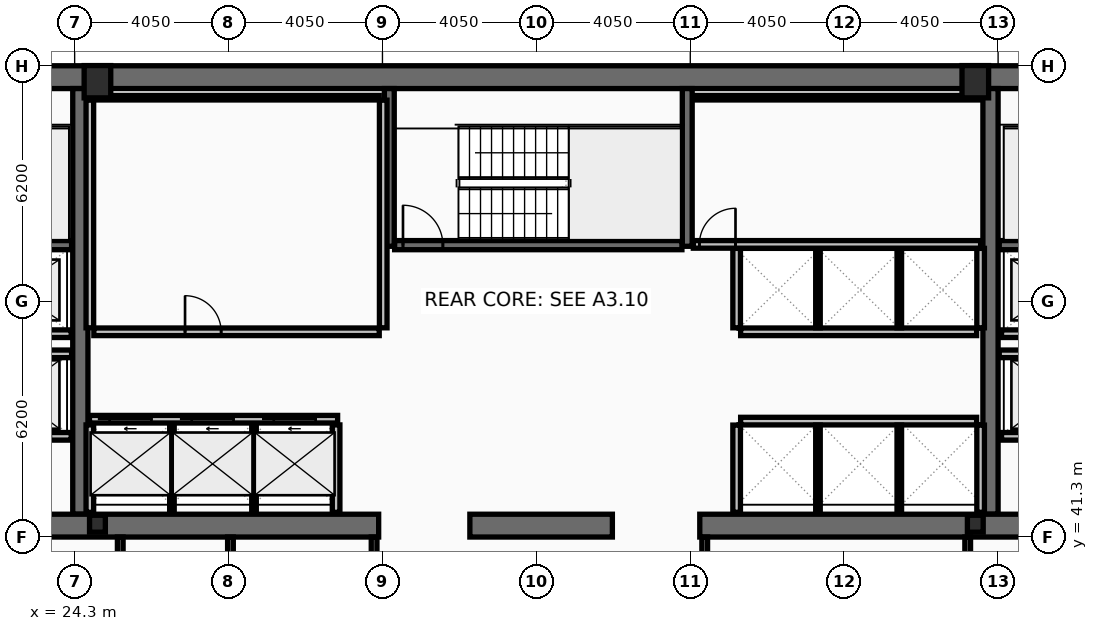
"""IFC4 building model, lengths in metres.
Left out: names, types, materials, properties, quantities, classifications, styles, units other than length and angle.
Written with IfcOpenShell. Run it as: python <this file> out.ifc"""

import sys

from ifc_helpers import new_model, si_unit, direction, frame, frame_2d, origin, origin_2d, place, context, subcontext, project, spatial, rectangle, hollow_rectangle, i_section, extrude, element, fill, save


model = new_model("IFC4")
c1 = context("Model", 3, precision=1e-05, world=origin(), true_north=direction((0.0, 1.0)))
c2 = subcontext(c1, "Body", "Model", "MODEL_VIEW")
j1 = project(units=[si_unit("LENGTHUNIT", "METRE"), si_unit("PLANEANGLEUNIT", "RADIAN")], contexts=[c1])
p1 = place(None, origin())
s1 = spatial("IfcSite", under=j1, at=p1, CompositionType="ELEMENT")
p2 = place(p1, origin())
s2 = spatial("IfcBuilding", under=s1, at=p2, CompositionType="ELEMENT")
p3 = place(p2, frame((0.0, 0.0, 177.0)))
s3 = spatial("IfcBuildingStorey", under=s2, at=p3, CompositionType="ELEMENT", Elevation=177.0)
p4 = place(p3, frame((16.2, 53.4, 0.0), z_axis=(0.0, 0.0, 1.0), x_axis=(1.0, 0.0, 0.0)))
e1 = element("IfcWall", 1, at=p4, inside=s3, PredefinedType="SHEAR", context=c2, shape_type="SweptSolid", body=[
    extrude(rectangle(XDim=40.5, YDim=0.6, at=frame_2d((20.25, 0.0))), origin(), (0.0, 0.0, 1.0), 3.44),
])
for number, where, z_axis, x_axis in (
    (2, (24.45, 41.9, 0.0), (0.0, 0.0, 1.0), (0.0, 1.0, 0.0)),
    (3, (48.4, 41.9, 0.0), (0.0, 0.0, 1.0), (0.0, 1.0, 0.0)),
):
    element("IfcWall", number, at=place(p3, frame(where, z_axis=z_axis, x_axis=x_axis)), inside=s3, PredefinedType="SHEAR", context=c2, shape_type="SweptSolid", body=[
        extrude(rectangle(XDim=11.2, YDim=0.4, at=frame_2d((5.6, 0.0))), origin(), (0.0, 0.0, 1.0), 3.44),
    ])
p5 = place(p3, frame((32.3, 41.6, 0.0), z_axis=(0.0, 0.0, 1.0), x_axis=(-1.0, 0.0, 0.0)))
e4 = element("IfcWall", 4, at=p5, inside=s3, PredefinedType="SHEAR", context=c2, shape_type="SweptSolid", body=[
    extrude(rectangle(XDim=11.45, YDim=0.6, at=frame_2d((5.725, 0.0))), origin(), (0.0, 0.0, 1.0), 3.44),
])
p6 = place(p3, frame((38.45, 41.6, 0.0), z_axis=(0.0, 0.0, 1.0), x_axis=(-1.0, 0.0, 0.0)))
e5 = element("IfcWall", 5, at=p6, inside=s3, PredefinedType="SHEAR", context=c2, shape_type="SweptSolid", body=[
    extrude(rectangle(XDim=3.75, YDim=0.6, at=frame_2d((1.875, 0.0))), origin(), (0.0, 0.0, 1.0), 3.44),
])
p7 = place(p3, frame((52.05, 41.6, 0.0), z_axis=(0.0, 0.0, 1.0), x_axis=(-1.0, 0.0, 0.0)))
e6 = element("IfcWall", 6, at=p7, inside=s3, PredefinedType="SHEAR", context=c2, shape_type="SweptSolid", body=[
    extrude(rectangle(XDim=11.3, YDim=0.6, at=frame_2d((5.65, 0.0))), origin(), (0.0, 0.0, 1.0), 3.44),
])
for number, where, z_axis, x_axis in (
    (7, (32.58, 48.95, 0.0), (0.0, 0.0, 1.0), (0.0, 1.0, 0.0)),
    (8, (40.42, 48.95, 0.0), (0.0, 0.0, 1.0), (0.0, 1.0, 0.0)),
):
    element("IfcWall", number, at=place(p3, frame(where, z_axis=z_axis, x_axis=x_axis)), inside=s3, PredefinedType="SHEAR", context=c2, shape_type="SweptSolid", body=[
        extrude(rectangle(XDim=4.15, YDim=0.26, at=frame_2d((2.075, 0.0))), origin(), (0.0, 0.0, 1.0), 3.44),
    ])
p8 = place(p3, frame((16.8, 48.98, 0.0), z_axis=(0.0, 0.0, 1.0), x_axis=(1.0, 0.0, 0.0)))
e9 = element("IfcWall", 9, at=p8, inside=s3, PredefinedType="SHEAR", context=c2, shape_type="SweptSolid", body=[
    extrude(rectangle(XDim=7.42, YDim=0.24, at=frame_2d((3.71, 0.0))), origin(), (0.0, 0.0, 1.0), 3.44),
])
p9 = place(p8, frame((0.22, 0.0, 0.0)))
e10 = element("IfcOpeningElement", 10, at=p9, cuts=e9, PredefinedType="OPENING", context=c2, shape_type="SweptSolid", body=[
    extrude(rectangle(XDim=1.05, YDim=2.15, at=frame_2d((0.525, 1.075))), frame((0.0, 0.13, 0.0), z_axis=(0.0, -1.0, 0.0), x_axis=(1.0, 0.0, 0.0)), (0.0, 0.0, 1.0), 0.26),
])
p10 = place(p3, frame((48.63, 48.98, 0.0), z_axis=(0.0, 0.0, 1.0), x_axis=(1.0, 0.0, 0.0)))
e11 = element("IfcWall", 11, at=p10, inside=s3, PredefinedType="SHEAR", context=c2, shape_type="SweptSolid", body=[
    extrude(rectangle(XDim=7.47, YDim=0.24, at=frame_2d((3.735, 0.0))), origin(), (0.0, 0.0, 1.0), 3.44),
])
p11 = place(p10, frame((6.2, 0.0, 0.0)))
e12 = element("IfcOpeningElement", 12, at=p11, cuts=e11, PredefinedType="OPENING", context=c2, shape_type="SweptSolid", body=[
    extrude(rectangle(XDim=1.05, YDim=2.15, at=frame_2d((0.525, 1.075))), frame((0.0, 0.13, 0.0), z_axis=(0.0, -1.0, 0.0), x_axis=(1.0, 0.0, 0.0)), (0.0, 0.0, 1.0), 0.26),
])
p12 = place(p3, frame((32.72, 48.98, 0.0), z_axis=(0.0, 0.0, 1.0), x_axis=(1.0, 0.0, 0.0)))
e13 = element("IfcWall", 13, at=p12, inside=s3, PredefinedType="SHEAR", context=c2, shape_type="SweptSolid", body=[
    extrude(rectangle(XDim=7.56, YDim=0.24, at=frame_2d((3.78, 0.0))), origin(), (0.0, 0.0, 1.0), 3.44),
])
p13 = place(p12, frame((0.22, 0.0, 0.0)))
e14 = element("IfcOpeningElement", 14, at=p13, cuts=e13, PredefinedType="OPENING", context=c2, shape_type="SweptSolid", body=[
    extrude(rectangle(XDim=1.05, YDim=2.15, at=frame_2d((0.525, 1.075))), frame((0.0, 0.13, 0.0), z_axis=(0.0, -1.0, 0.0), x_axis=(1.0, 0.0, 0.0)), (0.0, 0.0, 1.0), 0.26),
])
for number, where, z_axis, x_axis in (
    (15, (24.9, 53.28, 0.0), (0.0, 0.0, 1.0), (1.0, 0.0, 0.0)),
    (16, (48.0, 53.28, 0.0), (0.0, 0.0, 1.0), (1.0, 0.0, 0.0)),
):
    element("IfcColumn", number, at=place(p3, frame(where, z_axis=z_axis, x_axis=x_axis)), inside=s3, PredefinedType="COLUMN", context=c2, shape_type="SweptSolid", body=[
        extrude(hollow_rectangle(XDim=0.7, YDim=0.85, WallThickness=0.05, at=origin_2d()), origin(), (0.0, 0.0, 1.0), 3.6),
    ])
for number, where, z_axis, x_axis in (
    (17, (24.9, 41.65, 0.0), (0.0, 0.0, 1.0), (1.0, 0.0, 0.0)),
    (18, (48.0, 41.65, 0.0), (0.0, 0.0, 1.0), (1.0, 0.0, 0.0)),
):
    element("IfcColumn", number, at=place(p3, frame(where, z_axis=z_axis, x_axis=x_axis)), inside=s3, PredefinedType="COLUMN", context=c2, shape_type="SweptSolid", body=[
        extrude(i_section(OverallWidth=0.416, OverallDepth=0.446, WebThickness=0.039, FlangeThickness=0.063, at=origin_2d()), origin(), (0.0, 0.0, 1.0), 3.6),
    ])
p14 = place(p3, frame((24.69, 44.4, 0.0), z_axis=(0.0, 0.0, 1.0), x_axis=(1.0, 0.0, 0.0)))
e19 = element("IfcWall", 19, at=p14, inside=s3, PredefinedType="PARTITIONING", context=c2, shape_type="SweptSolid", body=[
    extrude(rectangle(XDim=6.53, YDim=0.2, at=frame_2d((3.265, 0.0))), origin(), (0.0, 0.0, 1.0), 3.44),
])
p15 = place(p14, frame((0.53, 0.0, 0.0)))
e20 = element("IfcOpeningElement", 20, at=p15, cuts=e19, PredefinedType="OPENING", context=c2, shape_type="SweptSolid", body=[
    extrude(rectangle(XDim=1.1, YDim=2.18, at=frame_2d((0.55, 1.09))), frame((0.0, 0.11, 0.0), z_axis=(0.0, -1.0, 0.0), x_axis=(1.0, 0.0, 0.0)), (0.0, 0.0, 1.0), 0.22),
])
p16 = place(p14, frame((2.69, 0.0, 0.0)))
e21 = element("IfcOpeningElement", 21, at=p16, cuts=e19, PredefinedType="OPENING", context=c2, shape_type="SweptSolid", body=[
    extrude(rectangle(XDim=1.1, YDim=2.18, at=frame_2d((0.55, 1.09))), frame((0.0, 0.11, 0.0), z_axis=(0.0, -1.0, 0.0), x_axis=(1.0, 0.0, 0.0)), (0.0, 0.0, 1.0), 0.22),
])
p17 = place(p14, frame((4.85, 0.0, 0.0)))
e22 = element("IfcOpeningElement", 22, at=p17, cuts=e19, PredefinedType="OPENING", context=c2, shape_type="SweptSolid", body=[
    extrude(rectangle(XDim=1.1, YDim=2.18, at=frame_2d((0.55, 1.09))), frame((0.0, 0.11, 0.0), z_axis=(0.0, -1.0, 0.0), x_axis=(1.0, 0.0, 0.0)), (0.0, 0.0, 1.0), 0.22),
])
p18 = place(p3, frame((51.61, 43.95, 0.0), z_axis=(0.0, 0.0, 1.0), x_axis=(-1.0, 0.0, 0.0)))
e23 = element("IfcWall", 23, at=p18, inside=s3, PredefinedType="PARTITIONING", context=c2, shape_type="SweptSolid", body=[
    extrude(rectangle(XDim=2.92, YDim=0.2, at=frame_2d((1.46, 0.0))), origin(), (0.0, 0.0, 1.0), 3.44),
])
p19 = place(p18, frame((0.81, 0.0, 0.0)))
e24 = element("IfcOpeningElement", 24, at=p19, cuts=e23, PredefinedType="OPENING", context=c2, shape_type="SweptSolid", body=[
    extrude(rectangle(XDim=1.3, YDim=2.18, at=frame_2d((0.65, 1.09))), frame((0.0, 0.11, 0.0), z_axis=(0.0, -1.0, 0.0), x_axis=(1.0, 0.0, 0.0)), (0.0, 0.0, 1.0), 0.22),
])
p20 = place(p3, frame((24.21, 43.95, 0.0), z_axis=(0.0, 0.0, 1.0), x_axis=(-1.0, 0.0, 0.0)))
e25 = element("IfcWall", 25, at=p20, inside=s3, PredefinedType="PARTITIONING", context=c2, shape_type="SweptSolid", body=[
    extrude(rectangle(XDim=2.97, YDim=0.2, at=frame_2d((1.485, 0.0))), origin(), (0.0, 0.0, 1.0), 3.44),
])
p21 = place(p20, frame((0.86, 0.0, 0.0)))
e26 = element("IfcOpeningElement", 26, at=p21, cuts=e25, PredefinedType="OPENING", context=c2, shape_type="SweptSolid", body=[
    extrude(rectangle(XDim=1.3, YDim=2.18, at=frame_2d((0.65, 1.09))), frame((0.0, 0.11, 0.0), z_axis=(0.0, -1.0, 0.0), x_axis=(1.0, 0.0, 0.0)), (0.0, 0.0, 1.0), 0.22),
])
p22 = place(p3, frame((51.61, 46.65, 0.0), z_axis=(0.0, 0.0, 1.0), x_axis=(-1.0, 0.0, 0.0)))
e27 = element("IfcWall", 27, at=p22, inside=s3, PredefinedType="PARTITIONING", context=c2, shape_type="SweptSolid", body=[
    extrude(rectangle(XDim=2.92, YDim=0.2, at=frame_2d((1.46, 0.0))), origin(), (0.0, 0.0, 1.0), 3.44),
])
p23 = place(p22, frame((0.86, 0.0, 0.0)))
e28 = element("IfcOpeningElement", 28, at=p23, cuts=e27, PredefinedType="OPENING", context=c2, shape_type="SweptSolid", body=[
    extrude(rectangle(XDim=1.2, YDim=2.18, at=frame_2d((0.6, 1.09))), frame((0.0, 0.11, 0.0), z_axis=(0.0, -1.0, 0.0), x_axis=(1.0, 0.0, 0.0)), (0.0, 0.0, 1.0), 0.22),
])
p24 = place(p3, frame((24.21, 46.65, 0.0), z_axis=(0.0, 0.0, 1.0), x_axis=(-1.0, 0.0, 0.0)))
e29 = element("IfcWall", 29, at=p24, inside=s3, PredefinedType="PARTITIONING", context=c2, shape_type="SweptSolid", body=[
    extrude(rectangle(XDim=2.97, YDim=0.2, at=frame_2d((1.485, 0.0))), origin(), (0.0, 0.0, 1.0), 3.44),
])
p25 = place(p24, frame((0.91, 0.0, 0.0)))
e30 = element("IfcOpeningElement", 30, at=p25, cuts=e29, PredefinedType="OPENING", context=c2, shape_type="SweptSolid", body=[
    extrude(rectangle(XDim=1.2, YDim=2.18, at=frame_2d((0.6, 1.09))), frame((0.0, 0.11, 0.0), z_axis=(0.0, -1.0, 0.0), x_axis=(1.0, 0.0, 0.0)), (0.0, 0.0, 1.0), 0.22),
])
p26 = place(p3, frame((21.2, 46.12, 0.0), z_axis=(0.0, 0.0, 1.0), x_axis=(1.0, 0.0, 0.0)))
e31 = element("IfcWall", 31, at=p26, inside=s3, PredefinedType="PARTITIONING", context=c2, shape_type="SweptSolid", body=[
    extrude(rectangle(XDim=3.02, YDim=0.2, at=frame_2d((1.51, 0.0))), origin(), (0.0, 0.0, 1.0), 3.44),
])
p27 = place(p3, frame((48.63, 46.12, 0.0), z_axis=(0.0, 0.0, 1.0), x_axis=(1.0, 0.0, 0.0)))
e32 = element("IfcWall", 32, at=p27, inside=s3, PredefinedType="PARTITIONING", context=c2, shape_type="SweptSolid", body=[
    extrude(rectangle(XDim=3.07, YDim=0.2, at=frame_2d((1.535, 0.0))), origin(), (0.0, 0.0, 1.0), 3.44),
])
for number, where, z_axis, x_axis in (
    (33, (24.7, 46.805, 0.0), (0.0, 0.0, 1.0), (0.0, 1.0, 0.0)),
    (34, (32.42, 46.805, 0.0), (0.0, 0.0, 1.0), (0.0, 1.0, 0.0)),
):
    element("IfcWall", number, at=place(p3, frame(where, z_axis=z_axis, x_axis=x_axis)), inside=s3, PredefinedType="PARTITIONING", context=c2, shape_type="SweptSolid", body=[
        extrude(rectangle(XDim=5.99, YDim=0.2, at=frame_2d((2.995, 0.0))), origin(), (0.0, 0.0, 1.0), 3.44),
    ])
p28 = place(p3, frame((24.805, 52.86, 0.0), z_axis=(0.0, 0.0, 1.0), x_axis=(1.0, 0.0, 0.0)))
e35 = element("IfcWall", 35, at=p28, inside=s3, PredefinedType="PARTITIONING", context=c2, shape_type="SweptSolid", body=[
    extrude(rectangle(XDim=7.51, YDim=0.12, at=frame_2d((3.755, 0.0))), origin(), (0.0, 0.0, 1.0), 3.44),
])
p29 = place(p3, frame((24.805, 46.7, 0.0), z_axis=(0.0, 0.0, 1.0), x_axis=(1.0, 0.0, 0.0)))
e36 = element("IfcWall", 36, at=p29, inside=s3, PredefinedType="PARTITIONING", context=c2, shape_type="SweptSolid", body=[
    extrude(rectangle(XDim=7.51, YDim=0.2, at=frame_2d((3.755, 0.0))), origin(), (0.0, 0.0, 1.0), 3.44),
])
p30 = place(p29, frame((2.4, 0.0, 0.0)))
e37 = element("IfcOpeningElement", 37, at=p30, cuts=e36, PredefinedType="OPENING", context=c2, shape_type="SweptSolid", body=[
    extrude(rectangle(XDim=0.95, YDim=2.1, at=frame_2d((0.475, 1.05))), frame((0.0, 0.11, 0.0), z_axis=(0.0, -1.0, 0.0), x_axis=(1.0, 0.0, 0.0)), (0.0, 0.0, 1.0), 0.22),
])
for number, where, z_axis, x_axis in (
    (38, (24.7, 41.95, 0.0), (0.0, 0.0, 1.0), (0.0, 1.0, 0.0)),
    (39, (31.18, 41.95, 0.0), (0.0, 0.0, 1.0), (0.0, 1.0, 0.0)),
):
    element("IfcWall", number, at=place(p3, frame(where, z_axis=z_axis, x_axis=x_axis)), inside=s3, PredefinedType="PARTITIONING", context=c2, shape_type="SweptSolid", body=[
        extrude(rectangle(XDim=2.3, YDim=0.2, at=frame_2d((1.15, 0.0))), origin(), (0.0, 0.0, 1.0), 3.44),
    ])
for number, where, z_axis, x_axis in (
    (40, (26.86, 41.95, 0.0), (0.0, 0.0, 1.0), (0.0, 1.0, 0.0)),
    (41, (29.02, 41.95, 0.0), (0.0, 0.0, 1.0), (0.0, 1.0, 0.0)),
):
    element("IfcWall", number, at=place(p3, frame(where, z_axis=z_axis, x_axis=x_axis)), inside=s3, PredefinedType="PARTITIONING", context=c2, shape_type="SweptSolid", body=[
        extrude(rectangle(XDim=2.3, YDim=0.12, at=frame_2d((1.15, 0.0))), origin(), (0.0, 0.0, 1.0), 3.44),
    ])
p31 = place(p3, frame((41.825, 46.7, 0.0), z_axis=(0.0, 0.0, 1.0), x_axis=(1.0, 0.0, 0.0)))
e42 = element("IfcWall", 42, at=p31, inside=s3, PredefinedType="PARTITIONING", context=c2, shape_type="SweptSolid", body=[
    extrude(rectangle(XDim=6.21, YDim=0.2, at=frame_2d((3.105, 0.0))), origin(), (0.0, 0.0, 1.0), 3.44),
])
for number, where, z_axis, x_axis in (
    (43, (41.72, 46.805, 0.0), (0.0, 0.0, 1.0), (0.0, 1.0, 0.0)),
    (44, (48.14, 46.805, 0.0), (0.0, 0.0, 1.0), (0.0, 1.0, 0.0)),
):
    element("IfcWall", number, at=place(p3, frame(where, z_axis=z_axis, x_axis=x_axis)), inside=s3, PredefinedType="PARTITIONING", context=c2, shape_type="SweptSolid", body=[
        extrude(rectangle(XDim=2.09, YDim=0.2, at=frame_2d((1.045, 0.0))), origin(), (0.0, 0.0, 1.0), 3.44),
    ])
for number, where, z_axis, x_axis in (
    (45, (43.86, 46.805, 0.0), (0.0, 0.0, 1.0), (0.0, 1.0, 0.0)),
    (46, (46.0, 46.805, 0.0), (0.0, 0.0, 1.0), (0.0, 1.0, 0.0)),
):
    element("IfcWall", number, at=place(p3, frame(where, z_axis=z_axis, x_axis=x_axis)), inside=s3, PredefinedType="PARTITIONING", context=c2, shape_type="SweptSolid", body=[
        extrude(rectangle(XDim=2.09, YDim=0.12, at=frame_2d((1.045, 0.0))), origin(), (0.0, 0.0, 1.0), 3.44),
    ])
p32 = place(p3, frame((41.825, 44.35, 0.0), z_axis=(0.0, 0.0, 1.0), x_axis=(1.0, 0.0, 0.0)))
e47 = element("IfcWall", 47, at=p32, inside=s3, PredefinedType="PARTITIONING", context=c2, shape_type="SweptSolid", body=[
    extrude(rectangle(XDim=6.21, YDim=0.2, at=frame_2d((3.105, 0.0))), origin(), (0.0, 0.0, 1.0), 3.44),
])
for number, where, z_axis, x_axis in (
    (48, (41.72, 41.95, 0.0), (0.0, 0.0, 1.0), (0.0, 1.0, 0.0)),
    (49, (48.14, 41.95, 0.0), (0.0, 0.0, 1.0), (0.0, 1.0, 0.0)),
):
    element("IfcWall", number, at=place(p3, frame(where, z_axis=z_axis, x_axis=x_axis)), inside=s3, PredefinedType="PARTITIONING", context=c2, shape_type="SweptSolid", body=[
        extrude(rectangle(XDim=2.295, YDim=0.2, at=frame_2d((1.147, 0.0))), origin(), (0.0, 0.0, 1.0), 3.44),
    ])
for number, where, z_axis, x_axis in (
    (50, (43.86, 41.95, 0.0), (0.0, 0.0, 1.0), (0.0, 1.0, 0.0)),
    (51, (46.0, 41.95, 0.0), (0.0, 0.0, 1.0), (0.0, 1.0, 0.0)),
):
    element("IfcWall", number, at=place(p3, frame(where, z_axis=z_axis, x_axis=x_axis)), inside=s3, PredefinedType="PARTITIONING", context=c2, shape_type="SweptSolid", body=[
        extrude(rectangle(XDim=2.295, YDim=0.12, at=frame_2d((1.147, 0.0))), origin(), (0.0, 0.0, 1.0), 3.44),
    ])
p33 = place(p3, frame((40.58, 52.86, 0.0), z_axis=(0.0, 0.0, 1.0), x_axis=(1.0, 0.0, 0.0)))
e52 = element("IfcWall", 52, at=p33, inside=s3, PredefinedType="PARTITIONING", context=c2, shape_type="SweptSolid", body=[
    extrude(rectangle(XDim=7.56, YDim=0.12, at=frame_2d((3.78, 0.0))), origin(), (0.0, 0.0, 1.0), 3.44),
])
p34 = place(p3, frame((40.58, 49.0, 0.0), z_axis=(0.0, 0.0, 1.0), x_axis=(1.0, 0.0, 0.0)))
e53 = element("IfcWall", 53, at=p34, inside=s3, PredefinedType="PARTITIONING", context=c2, shape_type="SweptSolid", body=[
    extrude(rectangle(XDim=7.56, YDim=0.2, at=frame_2d((3.78, 0.0))), origin(), (0.0, 0.0, 1.0), 3.44),
])
p35 = place(p34, frame((0.16, 0.0, 0.0)))
e54 = element("IfcOpeningElement", 54, at=p35, cuts=e53, PredefinedType="OPENING", context=c2, shape_type="SweptSolid", body=[
    extrude(rectangle(XDim=0.95, YDim=2.1, at=frame_2d((0.475, 1.05))), frame((0.0, 0.11, 0.0), z_axis=(0.0, -1.0, 0.0), x_axis=(1.0, 0.0, 0.0)), (0.0, 0.0, 1.0), 0.22),
])
for number, where, z_axis, x_axis in (
    (55, (25.5, 38.28, 0.0), (0.0, 0.0, 1.0), (0.0, 1.0, 0.0)),
    (56, (28.4, 38.28, 0.0), (0.0, 0.0, 1.0), (0.0, 1.0, 0.0)),
    (57, (32.18, 38.28, 0.0), (0.0, 0.0, 1.0), (0.0, 1.0, 0.0)),
    (58, (40.88, 38.28, 0.0), (0.0, 0.0, 1.0), (0.0, 1.0, 0.0)),
):
    element("IfcWall", number, at=place(p3, frame(where, z_axis=z_axis, x_axis=x_axis)), inside=s3, PredefinedType="PARTITIONING", context=c2, shape_type="SweptSolid", body=[
        extrude(rectangle(XDim=3.02, YDim=0.15, at=frame_2d((1.51, 0.0))), origin(), (0.0, 0.0, 1.0), 3.44),
    ])
p36 = place(p3, frame((47.8, 38.28, 0.0), z_axis=(0.0, 0.0, 1.0), x_axis=(0.0, 1.0, 0.0)))
e59 = element("IfcWall", 59, at=p36, inside=s3, PredefinedType="PARTITIONING", context=c2, shape_type="SweptSolid", body=[
    extrude(rectangle(XDim=3.02, YDim=0.15, at=frame_2d((1.51, 0.0))), origin(), (0.0, 0.0, 1.0), 2.73),
])
p37 = place(p13, origin())
e60 = element("IfcDoor", 60, at=p37, inside=s3, OperationType="SINGLE_SWING_LEFT", PredefinedType="DOOR", context=c2, shape_type="SweptSolid", body=[
    extrude(rectangle(XDim=1.05, YDim=2.15, at=frame_2d((0.525, 1.075))), frame((0.0, 0.025, 0.0), z_axis=(0.0, -1.0, 0.0), x_axis=(1.0, 0.0, 0.0)), (0.0, 0.0, 1.0), 0.05),
])
fill(e14, e60)
p38 = place(p15, origin())
e61 = element("IfcDoor", 61, at=p38, inside=s3, OperationType="SLIDING_TO_LEFT", PredefinedType="DOOR", context=c2, shape_type="SweptSolid", body=[
    extrude(rectangle(XDim=1.1, YDim=2.18, at=frame_2d((0.55, 1.09))), frame((0.0, 0.025, 0.0), z_axis=(0.0, -1.0, 0.0), x_axis=(1.0, 0.0, 0.0)), (0.0, 0.0, 1.0), 0.05),
])
fill(e20, e61)
p39 = place(p16, origin())
e62 = element("IfcDoor", 62, at=p39, inside=s3, OperationType="SLIDING_TO_LEFT", PredefinedType="DOOR", context=c2, shape_type="SweptSolid", body=[
    extrude(rectangle(XDim=1.1, YDim=2.18, at=frame_2d((0.55, 1.09))), frame((0.0, 0.025, 0.0), z_axis=(0.0, -1.0, 0.0), x_axis=(1.0, 0.0, 0.0)), (0.0, 0.0, 1.0), 0.05),
])
fill(e21, e62)
p40 = place(p17, origin())
e63 = element("IfcDoor", 63, at=p40, inside=s3, OperationType="SLIDING_TO_LEFT", PredefinedType="DOOR", context=c2, shape_type="SweptSolid", body=[
    extrude(rectangle(XDim=1.1, YDim=2.18, at=frame_2d((0.55, 1.09))), frame((0.0, 0.025, 0.0), z_axis=(0.0, -1.0, 0.0), x_axis=(1.0, 0.0, 0.0)), (0.0, 0.0, 1.0), 0.05),
])
fill(e22, e63)
p41 = place(p30, origin())
e64 = element("IfcDoor", 64, at=p41, inside=s3, OperationType="SINGLE_SWING_LEFT", PredefinedType="DOOR", context=c2, shape_type="SweptSolid", body=[
    extrude(rectangle(XDim=0.95, YDim=2.1, at=frame_2d((0.475, 1.05))), frame((0.0, 0.025, 0.0), z_axis=(0.0, -1.0, 0.0), x_axis=(1.0, 0.0, 0.0)), (0.0, 0.0, 1.0), 0.05),
])
fill(e37, e64)
p42 = place(p35, origin())
e65 = element("IfcDoor", 65, at=p42, inside=s3, OperationType="SINGLE_SWING_RIGHT", PredefinedType="DOOR", context=c2, shape_type="SweptSolid", body=[
    extrude(rectangle(XDim=0.95, YDim=2.1, at=frame_2d((0.475, 1.05))), frame((0.0, 0.025, 0.0), z_axis=(0.0, -1.0, 0.0), x_axis=(1.0, 0.0, 0.0)), (0.0, 0.0, 1.0), 0.05),
])
fill(e54, e65)
save(model, sys.argv[1])
